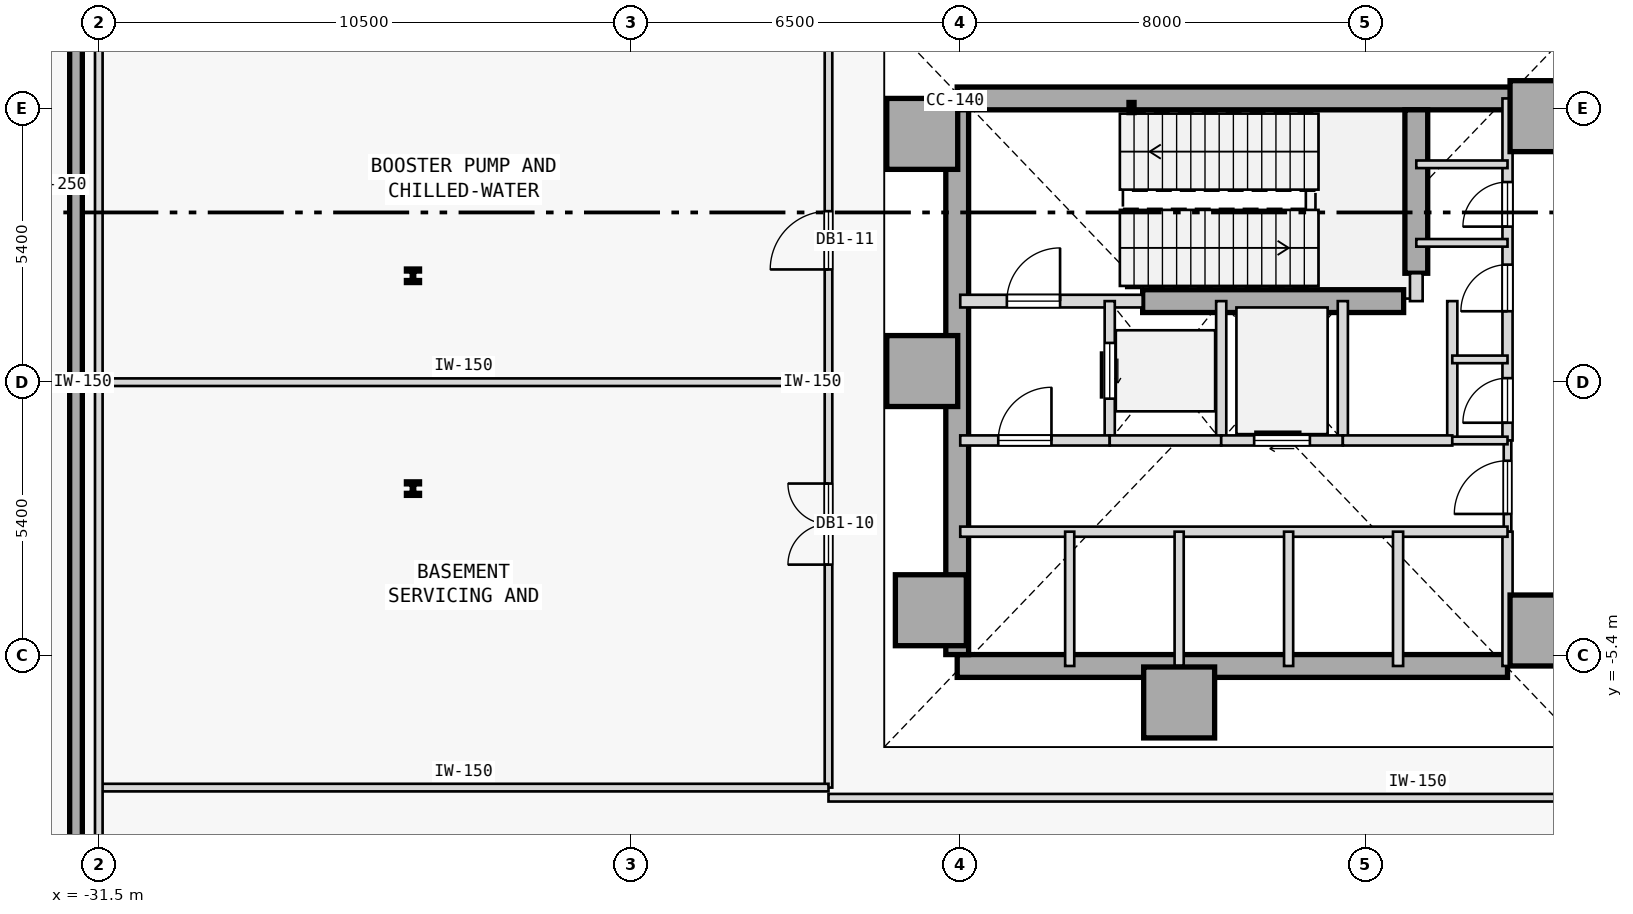
"""IFC4 building model, lengths in metres.
Left out: names, types, materials, properties, quantities, classifications, styles, units other than length and angle.
Written with IfcOpenShell. Run it as: python <this file> out.ifc"""

import sys

from ifc_helpers import new_model, si_unit, direction, frame, frame_2d, origin, origin_2d, place, context, subcontext, project, spatial, rectangle, hollow_rectangle, i_section, extrude, element, fill, save


model = new_model("IFC4")
c1 = context("Model", 3, precision=1e-05, world=origin(), true_north=direction((0.0, 1.0)))
c2 = subcontext(c1, "Body", "Model", "MODEL_VIEW")
j1 = project(units=[si_unit("LENGTHUNIT", "METRE"), si_unit("PLANEANGLEUNIT", "RADIAN")], contexts=[c1])
p1 = place(None, origin())
s1 = spatial("IfcSite", under=j1, at=p1, CompositionType="ELEMENT")
p2 = place(p1, origin())
s2 = spatial("IfcBuilding", under=s1, at=p2, CompositionType="ELEMENT")
p3 = place(p2, frame((0.0, 0.0, -5.0)))
s3 = spatial("IfcBuildingStorey", under=s2, at=p3, CompositionType="ELEMENT", Elevation=-5.0)
p4 = place(p3, frame((-31.95, -16.0, 0.0), z_axis=(0.0, 0.0, 1.0), x_axis=(0.0, 1.0, 0.0)))
e1 = element("IfcWall", 1, at=p4, inside=s3, PredefinedType="SHEAR", context=c2, shape_type="SweptSolid", body=[
    extrude(rectangle(XDim=39.8, YDim=0.25, at=frame_2d((19.9, 0.0))), origin(), (0.0, 0.0, 1.0), 4.7),
])
for number, where, z_axis, x_axis in (
    (2, (-15.25, 4.9, 0.0), (0.0, 0.0, 1.0), (1.0, 0.0, 0.0)),
    (3, (-15.25, 0.22, 0.0), (0.0, 0.0, 1.0), (1.0, 0.0, 0.0)),
    (4, (-15.08, -4.5, 0.0), (0.0, 0.0, 1.0), (1.0, 0.0, 0.0)),
    (5, (-10.18, -6.32, 0.0), (0.0, 0.0, 1.0), (1.0, 0.0, 0.0)),
    (6, (-2.95, -4.9, 0.0), (0.0, 0.0, 1.0), (1.0, 0.0, 0.0)),
    (7, (-2.95, 5.25, 0.0), (0.0, 0.0, 1.0), (1.0, 0.0, 0.0)),
):
    element("IfcColumn", number, at=place(p3, frame(where, z_axis=z_axis, x_axis=x_axis)), inside=s3, PredefinedType="COLUMN", context=c2, shape_type="SweptSolid", body=[
        extrude(rectangle(XDim=1.4, YDim=1.4, at=origin_2d()), origin(), (0.0, 0.0, 1.0), 5.0),
    ])
p5 = place(p3, frame((-14.56, 5.6, 0.0), z_axis=(0.0, 0.0, 1.0), x_axis=(1.0, 0.0, 0.0)))
e8 = element("IfcWall", 8, at=p5, inside=s3, PredefinedType="SHEAR", context=c2, shape_type="SweptSolid", body=[
    extrude(rectangle(XDim=11.41, YDim=0.45, at=frame_2d((5.705, 0.0))), origin(), (0.0, 0.0, 1.0), 4.7),
])
p6 = place(p3, frame((-14.56, -5.6, 0.0), z_axis=(0.0, 0.0, 1.0), x_axis=(1.0, 0.0, 0.0)))
e9 = element("IfcWall", 9, at=p6, inside=s3, PredefinedType="SHEAR", context=c2, shape_type="SweptSolid", body=[
    extrude(rectangle(XDim=10.86, YDim=0.45, at=frame_2d((5.43, 0.0))), origin(), (0.0, 0.0, 1.0), 4.7),
])
p7 = place(p3, frame((-14.56, -5.375, 0.0), z_axis=(0.0, 0.0, 1.0), x_axis=(0.0, 1.0, 0.0)))
e10 = element("IfcWall", 10, at=p7, inside=s3, PredefinedType="SHEAR", context=c2, shape_type="SweptSolid", body=[
    extrude(rectangle(XDim=10.75, YDim=0.45, at=frame_2d((5.375, 0.0))), origin(), (0.0, 0.0, 1.0), 4.7),
])
p8 = place(p3, frame((-5.5, 2.15, 0.0), z_axis=(0.0, 0.0, 1.0), x_axis=(0.0, 1.0, 0.0)))
e11 = element("IfcWall", 11, at=p8, inside=s3, PredefinedType="SHEAR", context=c2, shape_type="SweptSolid", body=[
    extrude(rectangle(XDim=3.225, YDim=0.45, at=frame_2d((1.613, 0.0))), origin(), (0.0, 0.0, 1.0), 4.7),
])
p9 = place(p3, frame((-10.9, 1.6, 0.0), z_axis=(0.0, 0.0, 1.0), x_axis=(1.0, 0.0, 0.0)))
e12 = element("IfcWall", 12, at=p9, inside=s3, PredefinedType="SHEAR", context=c2, shape_type="SweptSolid", body=[
    extrude(rectangle(XDim=5.15, YDim=0.45, at=frame_2d((2.575, 0.0))), origin(), (0.0, 0.0, 1.0), 4.7),
])
p10 = place(p3, frame((-11.12, 5.42, 0.0), z_axis=(0.0, 0.0, 1.0), x_axis=(1.0, 0.0, 0.0)))
e13 = element("IfcColumn", 13, at=p10, inside=s3, PredefinedType="COLUMN", context=c2, shape_type="SweptSolid", body=[
    extrude(hollow_rectangle(XDim=0.1, YDim=0.2, WallThickness=0.008, at=origin_2d()), origin(), (0.0, 0.0, 1.0), 5.0),
])
for number, where, z_axis, x_axis in (
    (14, (-25.3, -2.1, 0.0), (0.0, 0.0, 1.0), (1.0, 0.0, 0.0)),
    (15, (-25.3, 2.1, 0.0), (0.0, 0.0, 1.0), (1.0, 0.0, 0.0)),
):
    element("IfcColumn", number, at=place(p3, frame(where, z_axis=z_axis, x_axis=x_axis)), inside=s3, PredefinedType="COLUMN", context=c2, shape_type="SweptSolid", body=[
        extrude(i_section(OverallWidth=0.259, OverallDepth=0.267, WebThickness=0.013, FlangeThickness=0.021, FilletRadius=0.013, at=origin_2d()), origin(), (0.0, 0.0, 1.0), 5.0),
    ])
p11 = place(p3, frame((-14.5, 1.6, 0.0), z_axis=(0.0, 0.0, 1.0), x_axis=(1.0, 0.0, 0.0)))
e16 = element("IfcWall", 16, at=p11, inside=s3, PredefinedType="STANDARD", context=c2, shape_type="SweptSolid", body=[
    extrude(rectangle(XDim=3.6, YDim=0.25, at=frame_2d((1.8, 0.0))), origin(), (0.0, 0.0, 1.0), 4.7),
])
p12 = place(p11, frame((0.92, 0.0, 0.0)))
e17 = element("IfcOpeningElement", 17, at=p12, cuts=e16, PredefinedType="OPENING", context=c2, shape_type="SweptSolid", body=[
    extrude(rectangle(XDim=1.05, YDim=2.15, at=frame_2d((0.525, 1.075))), frame((0.0, 0.135, 0.0), z_axis=(0.0, -1.0, 0.0), x_axis=(1.0, 0.0, 0.0)), (0.0, 0.0, 1.0), 0.27),
])
p13 = place(p3, frame((-5.5, 1.6, 0.0), z_axis=(0.0, 0.0, 1.0), x_axis=(0.0, 1.0, 0.0)))
e18 = element("IfcWall", 18, at=p13, inside=s3, PredefinedType="STANDARD", context=c2, shape_type="SweptSolid", body=[
    extrude(rectangle(XDim=0.55, YDim=0.25, at=frame_2d((0.275, 0.0))), origin(), (0.0, 0.0, 1.0), 4.7),
])
p14 = place(p3, frame((-3.7, -1.15, 0.0), z_axis=(0.0, 0.0, 1.0), x_axis=(0.0, 1.0, 0.0)))
e19 = element("IfcWall", 19, at=p14, inside=s3, PredefinedType="STANDARD", context=c2, shape_type="SweptSolid", body=[
    extrude(rectangle(XDim=6.75, YDim=0.2, at=frame_2d((3.375, 0.0))), origin(), (0.0, 0.0, 1.0), 4.7),
])
p15 = place(p14, frame((0.35, 0.0, 0.0)))
e20 = element("IfcOpeningElement", 20, at=p15, cuts=e19, PredefinedType="OPENING", context=c2, shape_type="SweptSolid", body=[
    extrude(rectangle(XDim=0.88, YDim=2.15, at=frame_2d((0.44, 1.075))), frame((0.0, 0.11, 0.0), z_axis=(0.0, -1.0, 0.0), x_axis=(1.0, 0.0, 0.0)), (0.0, 0.0, 1.0), 0.22),
])
p16 = place(p14, frame((2.55, 0.0, 0.0)))
e21 = element("IfcOpeningElement", 21, at=p16, cuts=e19, PredefinedType="OPENING", context=c2, shape_type="SweptSolid", body=[
    extrude(rectangle(XDim=0.92, YDim=2.15, at=frame_2d((0.46, 1.075))), frame((0.0, 0.11, 0.0), z_axis=(0.0, -1.0, 0.0), x_axis=(1.0, 0.0, 0.0)), (0.0, 0.0, 1.0), 0.22),
])
p17 = place(p14, frame((4.22, 0.0, 0.0)))
e22 = element("IfcOpeningElement", 22, at=p17, cuts=e19, PredefinedType="OPENING", context=c2, shape_type="SweptSolid", body=[
    extrude(rectangle(XDim=0.88, YDim=2.15, at=frame_2d((0.44, 1.075))), frame((0.0, 0.11, 0.0), z_axis=(0.0, -1.0, 0.0), x_axis=(1.0, 0.0, 0.0)), (0.0, 0.0, 1.0), 0.22),
])
p18 = place(p3, frame((-3.7, -2.95, 0.0), z_axis=(0.0, 0.0, 1.0), x_axis=(0.0, 1.0, 0.0)))
e23 = element("IfcWall", 23, at=p18, inside=s3, PredefinedType="PARTITIONING", context=c2, shape_type="SweptSolid", body=[
    extrude(rectangle(XDim=1.8, YDim=0.15, at=frame_2d((0.9, 0.0))), origin(), (0.0, 0.0, 1.0), 4.7),
])
p19 = place(p18, frame((0.35, 0.0, 0.0)))
e24 = element("IfcOpeningElement", 24, at=p19, cuts=e23, PredefinedType="OPENING", context=c2, shape_type="SweptSolid", body=[
    extrude(rectangle(XDim=1.05, YDim=2.18, at=frame_2d((0.525, 1.09))), frame((0.0, 0.085, 0.0), z_axis=(0.0, -1.0, 0.0), x_axis=(1.0, 0.0, 0.0)), (0.0, 0.0, 1.0), 0.17),
])
p20 = place(p3, frame((-3.7, -5.6, 0.0), z_axis=(0.0, 0.0, 1.0), x_axis=(0.0, 1.0, 0.0)))
e25 = element("IfcWall", 25, at=p20, inside=s3, PredefinedType="STANDARD", context=c2, shape_type="SweptSolid", body=[
    extrude(rectangle(XDim=2.65, YDim=0.2, at=frame_2d((1.325, 0.0))), origin(), (0.0, 0.0, 1.0), 4.7),
])
p21 = place(p3, frame((-11.55, -1.15, 0.0), z_axis=(0.0, 0.0, 1.0), x_axis=(0.0, 1.0, 0.0)))
e26 = element("IfcWall", 26, at=p21, inside=s3, PredefinedType="STANDARD", context=c2, shape_type="SweptSolid", body=[
    extrude(rectangle(XDim=2.75, YDim=0.2, at=frame_2d((1.375, 0.0))), origin(), (0.0, 0.0, 1.0), 4.7),
])
p22 = place(p21, frame((0.825, 0.0, 0.0)))
e27 = element("IfcOpeningElement", 27, at=p22, cuts=e26, PredefinedType="OPENING", context=c2, shape_type="SweptSolid", body=[
    extrude(rectangle(XDim=1.1, YDim=2.15, at=frame_2d((0.55, 1.075))), frame((0.0, 0.11, 0.0), z_axis=(0.0, -1.0, 0.0), x_axis=(1.0, 0.0, 0.0)), (0.0, 0.0, 1.0), 0.22),
])
p23 = place(p3, frame((-9.35, -1.15, 0.0), z_axis=(0.0, 0.0, 1.0), x_axis=(0.0, 1.0, 0.0)))
e28 = element("IfcWall", 28, at=p23, inside=s3, PredefinedType="STANDARD", context=c2, shape_type="SweptSolid", body=[
    extrude(rectangle(XDim=2.75, YDim=0.2, at=frame_2d((1.375, 0.0))), origin(), (0.0, 0.0, 1.0), 4.7),
])
p24 = place(p3, frame((-14.5, -1.15, 0.0), z_axis=(0.0, 0.0, 1.0), x_axis=(1.0, 0.0, 0.0)))
e29 = element("IfcWall", 29, at=p24, inside=s3, PredefinedType="STANDARD", context=c2, shape_type="SweptSolid", body=[
    extrude(rectangle(XDim=2.95, YDim=0.2, at=frame_2d((1.475, 0.0))), origin(), (0.0, 0.0, 1.0), 4.7),
])
p25 = place(p24, frame((0.75, 0.0, 0.0)))
e30 = element("IfcOpeningElement", 30, at=p25, cuts=e29, PredefinedType="OPENING", context=c2, shape_type="SweptSolid", body=[
    extrude(rectangle(XDim=1.05, YDim=2.18, at=frame_2d((0.525, 1.09))), frame((0.0, 0.11, 0.0), z_axis=(0.0, -1.0, 0.0), x_axis=(1.0, 0.0, 0.0)), (0.0, 0.0, 1.0), 0.22),
])
p26 = place(p3, frame((-11.55, -1.15, 0.0), z_axis=(0.0, 0.0, 1.0), x_axis=(1.0, 0.0, 0.0)))
e31 = element("IfcWall", 31, at=p26, inside=s3, PredefinedType="STANDARD", context=c2, shape_type="SweptSolid", body=[
    extrude(rectangle(XDim=2.2, YDim=0.2, at=frame_2d((1.1, 0.0))), origin(), (0.0, 0.0, 1.0), 4.7),
])
p27 = place(p3, frame((-6.95, -1.15, 0.0), z_axis=(0.0, 0.0, 1.0), x_axis=(0.0, 1.0, 0.0)))
e32 = element("IfcWall", 32, at=p27, inside=s3, PredefinedType="STANDARD", context=c2, shape_type="SweptSolid", body=[
    extrude(rectangle(XDim=2.75, YDim=0.2, at=frame_2d((1.375, 0.0))), origin(), (0.0, 0.0, 1.0), 4.7),
])
p28 = place(p3, frame((-9.35, -1.15, 0.0), z_axis=(0.0, 0.0, 1.0), x_axis=(1.0, 0.0, 0.0)))
e33 = element("IfcWall", 33, at=p28, inside=s3, PredefinedType="STANDARD", context=c2, shape_type="SweptSolid", body=[
    extrude(rectangle(XDim=2.4, YDim=0.2, at=frame_2d((1.2, 0.0))), origin(), (0.0, 0.0, 1.0), 4.7),
])
p29 = place(p28, frame((0.65, 0.0, 0.0)))
e34 = element("IfcOpeningElement", 34, at=p29, cuts=e33, PredefinedType="OPENING", context=c2, shape_type="SweptSolid", body=[
    extrude(rectangle(XDim=1.1, YDim=2.15, at=frame_2d((0.55, 1.075))), frame((0.0, 0.11, 0.0), z_axis=(0.0, -1.0, 0.0), x_axis=(1.0, 0.0, 0.0)), (0.0, 0.0, 1.0), 0.22),
])
p30 = place(p3, frame((-4.79, -1.15, 0.0), z_axis=(0.0, 0.0, 1.0), x_axis=(0.0, 1.0, 0.0)))
e35 = element("IfcWall", 35, at=p30, inside=s3, PredefinedType="STANDARD", context=c2, shape_type="SweptSolid", body=[
    extrude(rectangle(XDim=2.75, YDim=0.2, at=frame_2d((1.375, 0.0))), origin(), (0.0, 0.0, 1.0), 4.7),
])
p31 = place(p3, frame((-6.95, -1.15, 0.0), z_axis=(0.0, 0.0, 1.0), x_axis=(1.0, 0.0, 0.0)))
e36 = element("IfcWall", 36, at=p31, inside=s3, PredefinedType="STANDARD", context=c2, shape_type="SweptSolid", body=[
    extrude(rectangle(XDim=2.16, YDim=0.2, at=frame_2d((1.08, 0.0))), origin(), (0.0, 0.0, 1.0), 4.7),
])
p32 = place(p3, frame((-4.79, -1.15, 0.0), z_axis=(0.0, 0.0, 1.0), x_axis=(1.0, 0.0, 0.0)))
e37 = element("IfcWall", 37, at=p32, inside=s3, PredefinedType="PARTITIONING", context=c2, shape_type="SweptSolid", body=[
    extrude(rectangle(XDim=1.09, YDim=0.15, at=frame_2d((0.545, 0.0))), origin(), (0.0, 0.0, 1.0), 4.7),
])
p33 = place(p3, frame((-14.5, -2.95, 0.0), z_axis=(0.0, 0.0, 1.0), x_axis=(1.0, 0.0, 0.0)))
e38 = element("IfcWall", 38, at=p33, inside=s3, PredefinedType="STANDARD", context=c2, shape_type="SweptSolid", body=[
    extrude(rectangle(XDim=10.8, YDim=0.2, at=frame_2d((5.4, 0.0))), origin(), (0.0, 0.0, 1.0), 4.7),
])
p34 = place(p3, frame((-5.86, -5.6, 0.0), z_axis=(0.0, 0.0, 1.0), x_axis=(0.0, 1.0, 0.0)))
e39 = element("IfcWall", 39, at=p34, inside=s3, PredefinedType="STANDARD", context=c2, shape_type="SweptSolid", body=[
    extrude(rectangle(XDim=2.65, YDim=0.2, at=frame_2d((1.325, 0.0))), origin(), (0.0, 0.0, 1.0), 4.7),
])
for number, where, z_axis, x_axis in (
    (40, (-12.34, -5.6, 0.0), (0.0, 0.0, 1.0), (0.0, 1.0, 0.0)),
    (41, (-10.18, -5.6, 0.0), (0.0, 0.0, 1.0), (0.0, 1.0, 0.0)),
    (42, (-8.02, -5.6, 0.0), (0.0, 0.0, 1.0), (0.0, 1.0, 0.0)),
):
    element("IfcWall", number, at=place(p3, frame(where, z_axis=z_axis, x_axis=x_axis)), inside=s3, PredefinedType="STANDARD", context=c2, shape_type="SweptSolid", body=[
        extrude(rectangle(XDim=2.65, YDim=0.18, at=frame_2d((1.325, 0.0))), origin(), (0.0, 0.0, 1.0), 4.7),
    ])
p35 = place(p3, frame((-5.5, 4.3, 0.0), z_axis=(0.0, 0.0, 1.0), x_axis=(1.0, 0.0, 0.0)))
e43 = element("IfcWall", 43, at=p35, inside=s3, PredefinedType="PARTITIONING", context=c2, shape_type="SweptSolid", body=[
    extrude(rectangle(XDim=1.8, YDim=0.15, at=frame_2d((0.9, 0.0))), origin(), (0.0, 0.0, 1.0), 4.7),
])
p36 = place(p3, frame((-4.79, 0.45, 0.0), z_axis=(0.0, 0.0, 1.0), x_axis=(1.0, 0.0, 0.0)))
e44 = element("IfcWall", 44, at=p36, inside=s3, PredefinedType="PARTITIONING", context=c2, shape_type="SweptSolid", body=[
    extrude(rectangle(XDim=1.09, YDim=0.15, at=frame_2d((0.545, 0.0))), origin(), (0.0, 0.0, 1.0), 4.7),
])
p37 = place(p3, frame((-5.5, 2.75, 0.0), z_axis=(0.0, 0.0, 1.0), x_axis=(1.0, 0.0, 0.0)))
e45 = element("IfcWall", 45, at=p37, inside=s3, PredefinedType="PARTITIONING", context=c2, shape_type="SweptSolid", body=[
    extrude(rectangle(XDim=1.8, YDim=0.15, at=frame_2d((0.9, 0.0))), origin(), (0.0, 0.0, 1.0), 4.7),
])
p38 = place(p3, frame((-17.1, -8.2, 0.0), z_axis=(0.0, 0.0, 1.0), x_axis=(1.0, 0.0, 0.0)))
e46 = element("IfcWall", 46, at=p38, inside=s3, PredefinedType="PARTITIONING", context=c2, shape_type="SweptSolid", body=[
    extrude(rectangle(XDim=33.9, YDim=0.15, at=frame_2d((16.95, 0.0))), origin(), (0.0, 0.0, 1.0), 4.7),
])
p39 = place(p38, frame((16.15, 0.0, 0.0)))
e47 = element("IfcOpeningElement", 47, at=p39, cuts=e46, PredefinedType="OPENING", context=c2, shape_type="SweptSolid", body=[
    extrude(rectangle(XDim=1.6, YDim=2.15, at=frame_2d((0.8, 1.075))), frame((0.0, 0.085, 0.0), z_axis=(0.0, -1.0, 0.0), x_axis=(1.0, 0.0, 0.0)), (0.0, 0.0, 1.0), 0.17),
])
p40 = place(p3, frame((-17.1, -8.0, 0.0), z_axis=(0.0, 0.0, 1.0), x_axis=(0.0, 1.0, 0.0)))
e48 = element("IfcWall", 48, at=p40, inside=s3, PredefinedType="PARTITIONING", context=c2, shape_type="SweptSolid", body=[
    extrude(rectangle(XDim=8.0, YDim=0.15, at=frame_2d((4.0, 0.0))), origin(), (0.0, 0.0, 1.0), 4.7),
])
p41 = place(p40, frame((4.4, 0.0, 0.0)))
e49 = element("IfcOpeningElement", 49, at=p41, cuts=e48, PredefinedType="OPENING", context=c2, shape_type="SweptSolid", body=[
    extrude(rectangle(XDim=1.6, YDim=2.15, at=frame_2d((0.8, 1.075))), frame((0.0, 0.085, 0.0), z_axis=(0.0, -1.0, 0.0), x_axis=(1.0, 0.0, 0.0)), (0.0, 0.0, 1.0), 0.17),
])
p42 = place(p3, frame((-17.1, 0.0, 0.0), z_axis=(0.0, 0.0, 1.0), x_axis=(0.0, 1.0, 0.0)))
e50 = element("IfcWall", 50, at=p42, inside=s3, PredefinedType="PARTITIONING", context=c2, shape_type="SweptSolid", body=[
    extrude(rectangle(XDim=8.0, YDim=0.15, at=frame_2d((4.0, 0.0))), origin(), (0.0, 0.0, 1.0), 4.7),
])
p43 = place(p42, frame((2.225, 0.0, 0.0)))
e51 = element("IfcOpeningElement", 51, at=p43, cuts=e50, PredefinedType="OPENING", context=c2, shape_type="SweptSolid", body=[
    extrude(rectangle(XDim=1.15, YDim=2.15, at=frame_2d((0.575, 1.075))), frame((0.0, 0.085, 0.0), z_axis=(0.0, -1.0, 0.0), x_axis=(1.0, 0.0, 0.0)), (0.0, 0.0, 1.0), 0.17),
])
for number, where, z_axis, x_axis in (
    (52, (-31.5, -8.0, 0.0), (0.0, 0.0, 1.0), (1.0, 0.0, 0.0)),
    (53, (-31.5, 0.0, 0.0), (0.0, 0.0, 1.0), (1.0, 0.0, 0.0)),
):
    element("IfcWall", number, at=place(p3, frame(where, z_axis=z_axis, x_axis=x_axis)), inside=s3, PredefinedType="PARTITIONING", context=c2, shape_type="SweptSolid", body=[
        extrude(rectangle(XDim=14.4, YDim=0.15, at=frame_2d((7.2, 0.0))), origin(), (0.0, 0.0, 1.0), 4.7),
    ])
p44 = place(p3, frame((-31.5, -27.8, 0.0), z_axis=(0.0, 0.0, 1.0), x_axis=(0.0, 1.0, 0.0)))
e54 = element("IfcWall", 54, at=p44, inside=s3, PredefinedType="PARTITIONING", context=c2, shape_type="SweptSolid", body=[
    extrude(rectangle(XDim=55.6, YDim=0.15, at=frame_2d((27.8, 0.0))), origin(), (0.0, 0.0, 1.0), 4.7),
])
p45 = place(p12, origin())
e55 = element("IfcDoor", 55, at=p45, inside=s3, OperationType="SINGLE_SWING_RIGHT", PredefinedType="DOOR", context=c2, shape_type="SweptSolid", body=[
    extrude(rectangle(XDim=1.05, YDim=2.15, at=frame_2d((0.525, 1.075))), frame((0.0, 0.025, 0.0), z_axis=(0.0, -1.0, 0.0), x_axis=(1.0, 0.0, 0.0)), (0.0, 0.0, 1.0), 0.05),
])
fill(e17, e55)
p46 = place(p25, origin())
e56 = element("IfcDoor", 56, at=p46, inside=s3, OperationType="SINGLE_SWING_RIGHT", PredefinedType="DOOR", context=c2, shape_type="SweptSolid", body=[
    extrude(rectangle(XDim=1.05, YDim=2.18, at=frame_2d((0.525, 1.09))), frame((0.0, 0.025, 0.0), z_axis=(0.0, -1.0, 0.0), x_axis=(1.0, 0.0, 0.0)), (0.0, 0.0, 1.0), 0.05),
])
fill(e30, e56)
p47 = place(p19, origin())
e57 = element("IfcDoor", 57, at=p47, inside=s3, OperationType="SINGLE_SWING_LEFT", PredefinedType="DOOR", context=c2, shape_type="SweptSolid", body=[
    extrude(rectangle(XDim=1.05, YDim=2.18, at=frame_2d((0.525, 1.09))), frame((0.0, 0.025, 0.0), z_axis=(0.0, -1.0, 0.0), x_axis=(1.0, 0.0, 0.0)), (0.0, 0.0, 1.0), 0.05),
])
fill(e24, e57)
p48 = place(p22, origin())
e58 = element("IfcDoor", 58, at=p48, inside=s3, OperationType="SLIDING_TO_RIGHT", PredefinedType="DOOR", context=c2, shape_type="SweptSolid", body=[
    extrude(rectangle(XDim=1.1, YDim=2.15, at=frame_2d((0.55, 1.075))), frame((0.0, 0.025, 0.0), z_axis=(0.0, -1.0, 0.0), x_axis=(1.0, 0.0, 0.0)), (0.0, 0.0, 1.0), 0.05),
])
fill(e27, e58)
p49 = place(p29, origin())
e59 = element("IfcDoor", 59, at=p49, inside=s3, OperationType="SLIDING_TO_RIGHT", PredefinedType="DOOR", context=c2, shape_type="SweptSolid", body=[
    extrude(rectangle(XDim=1.1, YDim=2.15, at=frame_2d((0.55, 1.075))), frame((0.0, 0.025, 0.0), z_axis=(0.0, -1.0, 0.0), x_axis=(1.0, 0.0, 0.0)), (0.0, 0.0, 1.0), 0.05),
])
fill(e34, e59)
p50 = place(p15, origin())
e60 = element("IfcDoor", 60, at=p50, inside=s3, OperationType="SINGLE_SWING_LEFT", PredefinedType="DOOR", context=c2, shape_type="SweptSolid", body=[
    extrude(rectangle(XDim=0.88, YDim=2.15, at=frame_2d((0.44, 1.075))), frame((0.0, 0.025, 0.0), z_axis=(0.0, -1.0, 0.0), x_axis=(1.0, 0.0, 0.0)), (0.0, 0.0, 1.0), 0.05),
])
fill(e20, e60)
p51 = place(p16, origin())
e61 = element("IfcDoor", 61, at=p51, inside=s3, OperationType="SINGLE_SWING_LEFT", PredefinedType="DOOR", context=c2, shape_type="SweptSolid", body=[
    extrude(rectangle(XDim=0.92, YDim=2.15, at=frame_2d((0.46, 1.075))), frame((0.0, 0.025, 0.0), z_axis=(0.0, -1.0, 0.0), x_axis=(1.0, 0.0, 0.0)), (0.0, 0.0, 1.0), 0.05),
])
fill(e21, e61)
p52 = place(p17, origin())
e62 = element("IfcDoor", 62, at=p52, inside=s3, OperationType="SINGLE_SWING_LEFT", PredefinedType="DOOR", context=c2, shape_type="SweptSolid", body=[
    extrude(rectangle(XDim=0.88, YDim=2.15, at=frame_2d((0.44, 1.075))), frame((0.0, 0.025, 0.0), z_axis=(0.0, -1.0, 0.0), x_axis=(1.0, 0.0, 0.0)), (0.0, 0.0, 1.0), 0.05),
])
fill(e22, e62)
p53 = place(p41, origin())
e63 = element("IfcDoor", 63, at=p53, inside=s3, OperationType="DOUBLE_DOOR_SINGLE_SWING", PredefinedType="DOOR", context=c2, shape_type="SweptSolid", body=[
    extrude(rectangle(XDim=1.6, YDim=2.15, at=frame_2d((0.8, 1.075))), frame((0.0, 0.025, 0.0), z_axis=(0.0, -1.0, 0.0), x_axis=(1.0, 0.0, 0.0)), (0.0, 0.0, 1.0), 0.05),
])
fill(e49, e63)
p54 = place(p43, origin())
e64 = element("IfcDoor", 64, at=p54, inside=s3, OperationType="SINGLE_SWING_LEFT", PredefinedType="DOOR", context=c2, shape_type="SweptSolid", body=[
    extrude(rectangle(XDim=1.15, YDim=2.15, at=frame_2d((0.575, 1.075))), frame((0.0, 0.025, 0.0), z_axis=(0.0, -1.0, 0.0), x_axis=(1.0, 0.0, 0.0)), (0.0, 0.0, 1.0), 0.05),
])
fill(e51, e64)
save(model, sys.argv[1])
